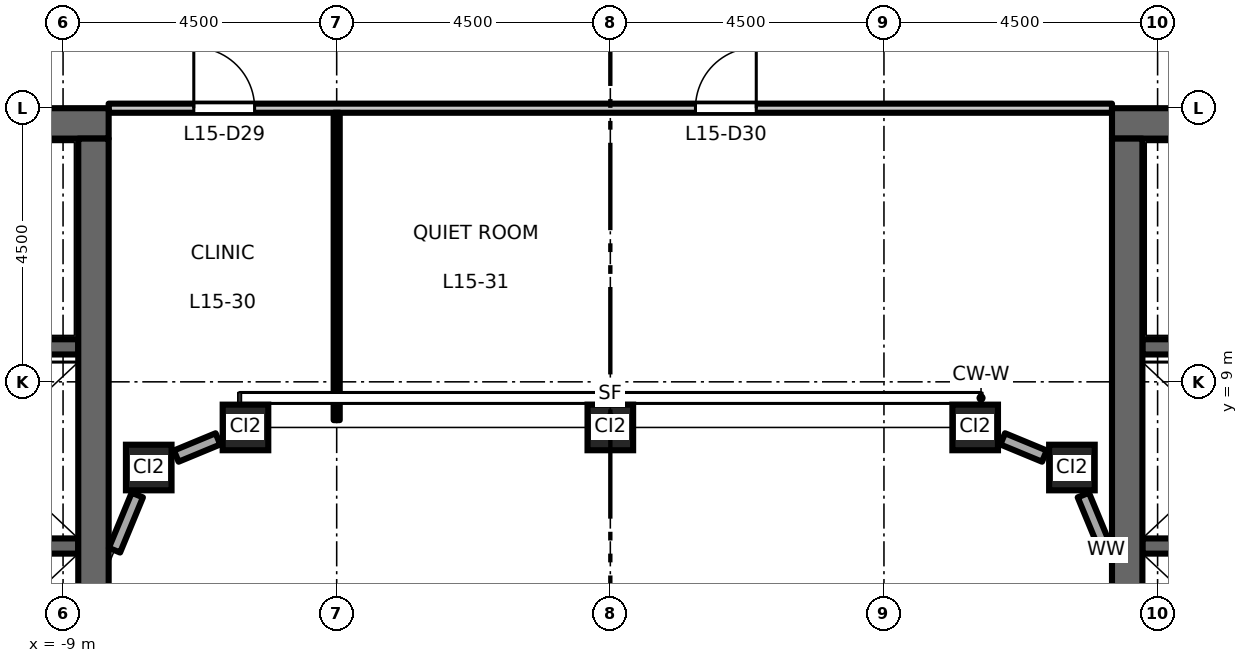
"""IFC4 building model, lengths in metres.
Left out: names, types, materials, properties, quantities, classifications, styles, units other than length and angle.
Written with IfcOpenShell. Run it as: python <this file> out.ifc"""

import sys

from ifc_helpers import new_model, si_unit, direction, frame, frame_2d, origin, origin_2d, place, context, subcontext, project, spatial, rectangle, hollow_rectangle, extrude, element, fill, save


model = new_model("IFC4")
c1 = context("Model", 3, precision=1e-05, world=origin(), true_north=direction((0.0, 1.0)))
c2 = subcontext(c1, "Body", "Model", "MODEL_VIEW")
j1 = project(units=[si_unit("LENGTHUNIT", "METRE"), si_unit("PLANEANGLEUNIT", "RADIAN")], contexts=[c1])
p1 = place(None, origin())
s1 = spatial("IfcSite", under=j1, at=p1, CompositionType="ELEMENT")
p2 = place(p1, origin())
s2 = spatial("IfcBuilding", under=s1, at=p2, CompositionType="ELEMENT")
p3 = place(p2, frame((0.0, 0.0, 71.7)))
s3 = spatial("IfcBuildingStorey", under=s2, at=p3, CompositionType="ELEMENT", Elevation=71.7)
for number, where, z_axis, x_axis in (
    (1, (-7.591, 7.591, 0.0), (0.0, 0.0, 1.0), (1.0, 0.0, 0.0)),
    (2, (-6.0, 8.25, 0.0), (0.0, 0.0, 1.0), (1.0, 0.0, 0.0)),
    (3, (0.0, 8.25, 0.0), (0.0, 0.0, 1.0), (1.0, 0.0, 0.0)),
    (4, (6.0, 8.25, 0.0), (0.0, 0.0, 1.0), (1.0, 0.0, 0.0)),
    (5, (7.591, 7.591, 0.0), (0.0, 0.0, 1.0), (1.0, 0.0, 0.0)),
):
    element("IfcColumn", number, at=place(p3, frame(where, z_axis=z_axis, x_axis=x_axis)), inside=s3, PredefinedType="COLUMN", context=c2, shape_type="SweptSolid", body=[
        extrude(hollow_rectangle(XDim=0.75, YDim=0.75, WallThickness=0.045, at=origin_2d()), origin(), (0.0, 0.0, 1.0), 4.5),
    ])
p4 = place(p3, frame((-8.75, 6.3, 0.0), z_axis=(0.0, 0.0, 1.0), x_axis=(-1.0, 0.0, 0.0)))
e6 = element("IfcWall", 6, at=p4, inside=s3, PredefinedType="SHEAR", context=c2, shape_type="SweptSolid", body=[
    extrude(rectangle(XDim=3.1, YDim=0.25, at=frame_2d((1.55, 0.0))), origin(), (0.0, 0.0, 1.0), 4.35),
])
p5 = place(p3, frame((-8.75, 9.575, 0.0), z_axis=(0.0, 0.0, 1.0), x_axis=(-1.0, 0.0, 0.0)))
e7 = element("IfcWall", 7, at=p5, inside=s3, PredefinedType="SHEAR", context=c2, shape_type="SweptSolid", body=[
    extrude(rectangle(XDim=8.0, YDim=0.25, at=frame_2d((4.0, 0.0))), origin(), (0.0, 0.0, 1.0), 4.35),
])
p6 = place(p5, frame((6.65, 0.0, 0.0)))
e8 = element("IfcOpeningElement", 8, at=p6, cuts=e7, PredefinedType="OPENING", context=c2, shape_type="SweptSolid", body=[
    extrude(rectangle(XDim=1.1, YDim=2.1, at=frame_2d((0.55, 1.05))), frame((0.0, 0.135, 0.0), z_axis=(0.0, -1.0, 0.0), x_axis=(1.0, 0.0, 0.0)), (0.0, 0.0, 1.0), 0.27),
])
p7 = place(p3, frame((-8.25, 13.25, 0.0), z_axis=(0.0, 0.0, 1.0), x_axis=(-1.0, 0.0, 0.0)))
e9 = element("IfcWall", 9, at=p7, inside=s3, PredefinedType="SHEAR", context=c2, shape_type="SweptSolid", body=[
    extrude(rectangle(XDim=13.5, YDim=0.5, at=frame_2d((6.75, 0.0))), origin(), (0.0, 0.0, 1.0), 4.35),
])
p8 = place(p3, frame((-8.5, -13.0, 0.0), z_axis=(0.0, 0.0, 1.0), x_axis=(0.0, 1.0, 0.0)))
e10 = element("IfcWall", 10, at=p8, inside=s3, PredefinedType="SHEAR", context=c2, shape_type="SweptSolid", body=[
    extrude(rectangle(XDim=26.0, YDim=0.5, at=frame_2d((13.0, 0.0))), origin(), (0.0, 0.0, 1.0), 4.35),
])
p9 = place(p3, frame((8.75, 6.3, 0.0), z_axis=(0.0, 0.0, 1.0), x_axis=(1.0, 0.0, 0.0)))
e11 = element("IfcWall", 11, at=p9, inside=s3, PredefinedType="SHEAR", context=c2, shape_type="SweptSolid", body=[
    extrude(rectangle(XDim=3.1, YDim=0.25, at=frame_2d((1.55, 0.0))), origin(), (0.0, 0.0, 1.0), 4.35),
])
p10 = place(p3, frame((8.75, 9.575, 0.0), z_axis=(0.0, 0.0, 1.0), x_axis=(1.0, 0.0, 0.0)))
e12 = element("IfcWall", 12, at=p10, inside=s3, PredefinedType="SHEAR", context=c2, shape_type="SweptSolid", body=[
    extrude(rectangle(XDim=8.0, YDim=0.25, at=frame_2d((4.0, 0.0))), origin(), (0.0, 0.0, 1.0), 4.35),
])
p11 = place(p10, frame((6.65, 0.0, 0.0)))
e13 = element("IfcOpeningElement", 13, at=p11, cuts=e12, PredefinedType="OPENING", context=c2, shape_type="SweptSolid", body=[
    extrude(rectangle(XDim=1.1, YDim=2.1, at=frame_2d((0.55, 1.05))), frame((0.0, 0.135, 0.0), z_axis=(0.0, -1.0, 0.0), x_axis=(1.0, 0.0, 0.0)), (0.0, 0.0, 1.0), 0.27),
])
p12 = place(p3, frame((8.25, 13.25, 0.0), z_axis=(0.0, 0.0, 1.0), x_axis=(1.0, 0.0, 0.0)))
e14 = element("IfcWall", 14, at=p12, inside=s3, PredefinedType="SHEAR", context=c2, shape_type="SweptSolid", body=[
    extrude(rectangle(XDim=13.5, YDim=0.5, at=frame_2d((6.75, 0.0))), origin(), (0.0, 0.0, 1.0), 4.35),
])
p13 = place(p3, frame((8.5, -13.0, 0.0), z_axis=(0.0, 0.0, 1.0), x_axis=(0.0, 1.0, 0.0)))
e15 = element("IfcWall", 15, at=p13, inside=s3, PredefinedType="SHEAR", context=c2, shape_type="SweptSolid", body=[
    extrude(rectangle(XDim=26.0, YDim=0.5, at=frame_2d((13.0, 0.0))), origin(), (0.0, 0.0, 1.0), 4.35),
])
p14 = place(p3, frame((8.154, 6.231, 0.0), z_axis=(0.0, 0.0, 1.0), x_axis=(-0.382549378284, 0.923935048136, 0.0)))
e16 = element("IfcWall", 16, at=p14, inside=s3, PredefinedType="STANDARD", context=c2, shape_type="SweptSolid", body=[
    extrude(rectangle(XDim=0.982, YDim=0.2, at=frame_2d((0.491, 0.0))), origin(), (0.0, 0.0, 1.0), 3.73),
])
for number, where, z_axis, x_axis in (
    (17, (7.138, 7.779, 0.0), (0.0, 0.0, 1.0), (-0.924, 0.383, 0.0)),
    (18, (-6.453, 8.062, 0.0), (0.0, 0.0, 1.0), (-0.924, -0.383, 0.0)),
):
    element("IfcWall", number, at=place(p3, frame(where, z_axis=z_axis, x_axis=x_axis)), inside=s3, PredefinedType="STANDARD", context=c2, shape_type="SweptSolid", body=[
        extrude(rectangle(XDim=0.742, YDim=0.2, at=frame_2d((0.371, 0.0))), origin(), (0.0, 0.0, 1.0), 3.73),
    ])
p15 = place(p3, frame((-7.779, 7.138, 0.0), z_axis=(0.0, 0.0, 1.0), x_axis=(-0.382549378284, -0.923935048136, 0.0)))
e19 = element("IfcWall", 19, at=p15, inside=s3, PredefinedType="STANDARD", context=c2, shape_type="SweptSolid", body=[
    extrude(rectangle(XDim=0.982, YDim=0.2, at=frame_2d((0.491, 0.0))), origin(), (0.0, 0.0, 1.0), 3.73),
])
p16 = place(p3, frame((-8.25, 13.5, 0.0), z_axis=(0.0, 0.0, 1.0), x_axis=(1.0, 0.0, 0.0)))
e20 = element("IfcWall", 20, at=p16, inside=s3, PredefinedType="PARTITIONING", context=c2, shape_type="SweptSolid", body=[
    extrude(rectangle(XDim=16.5, YDim=0.15, at=frame_2d((8.25, 0.0))), origin(), (0.0, 0.0, 1.0), 3.85),
])
p17 = place(p16, frame((1.4, 0.0, 0.0)))
e21 = element("IfcOpeningElement", 21, at=p17, cuts=e20, PredefinedType="OPENING", context=c2, shape_type="SweptSolid", body=[
    extrude(rectangle(XDim=1.0, YDim=2.1, at=frame_2d((0.5, 1.05))), frame((0.0, 0.085, 0.0), z_axis=(0.0, -1.0, 0.0), x_axis=(1.0, 0.0, 0.0)), (0.0, 0.0, 1.0), 0.17),
])
p18 = place(p16, frame((9.65, 0.0, 0.0)))
e22 = element("IfcOpeningElement", 22, at=p18, cuts=e20, PredefinedType="OPENING", context=c2, shape_type="SweptSolid", body=[
    extrude(rectangle(XDim=1.0, YDim=2.1, at=frame_2d((0.5, 1.05))), frame((0.0, 0.085, 0.0), z_axis=(0.0, -1.0, 0.0), x_axis=(1.0, 0.0, 0.0)), (0.0, 0.0, 1.0), 0.17),
])
p19 = place(p3, frame((-4.5, 8.37, 0.0), z_axis=(0.0, 0.0, 1.0), x_axis=(0.0, 1.0, 0.0)))
e23 = element("IfcWall", 23, at=p19, inside=s3, PredefinedType="PARTITIONING", context=c2, shape_type="SweptSolid", body=[
    extrude(rectangle(XDim=5.055, YDim=0.1, at=frame_2d((2.527, 0.0))), origin(), (0.0, 0.0, 1.0), 3.35),
])
p20 = place(p17, origin())
e24 = element("IfcDoor", 24, at=p20, inside=s3, OperationType="SINGLE_SWING_LEFT", PredefinedType="DOOR", context=c2, shape_type="SweptSolid", body=[
    extrude(rectangle(XDim=1.0, YDim=2.1, at=frame_2d((0.5, 1.05))), frame((0.0, 0.025, 0.0), z_axis=(0.0, -1.0, 0.0), x_axis=(1.0, 0.0, 0.0)), (0.0, 0.0, 1.0), 0.05),
])
fill(e21, e24)
p21 = place(p18, origin())
e25 = element("IfcDoor", 25, at=p21, inside=s3, OperationType="SINGLE_SWING_RIGHT", PredefinedType="DOOR", context=c2, shape_type="SweptSolid", body=[
    extrude(rectangle(XDim=1.0, YDim=2.1, at=frame_2d((0.5, 1.05))), frame((0.0, 0.025, 0.0), z_axis=(0.0, -1.0, 0.0), x_axis=(1.0, 0.0, 0.0)), (0.0, 0.0, 1.0), 0.05),
])
fill(e22, e25)
save(model, sys.argv[1])
